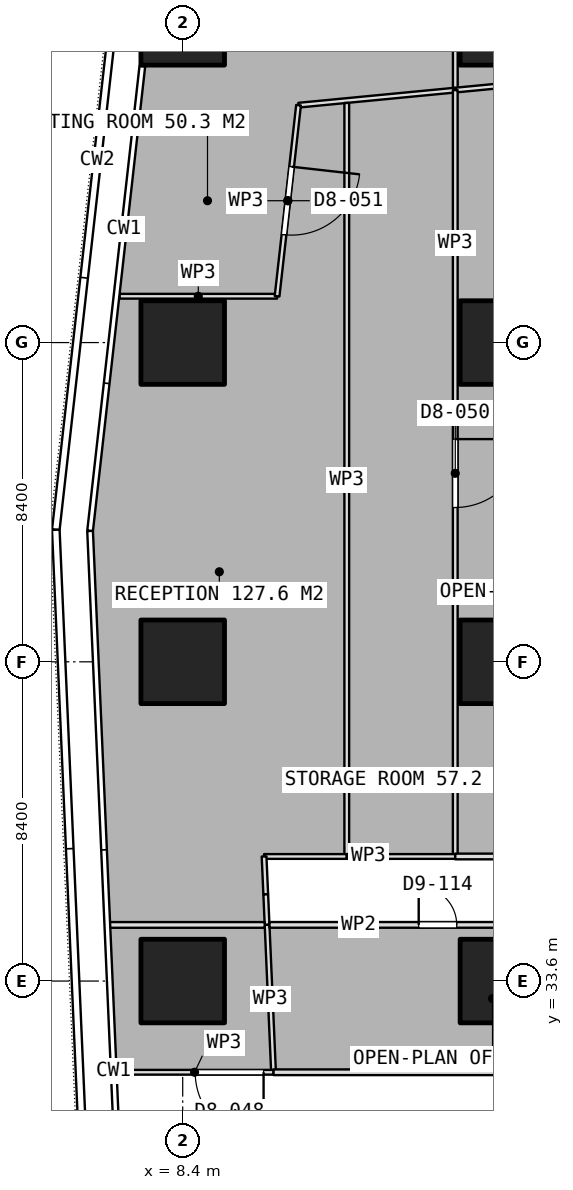
"""IFC4 building model, lengths in metres.
Left out: names, types, materials, properties, quantities, classifications, styles, units other than length and angle.
Written with IfcOpenShell. Run it as: python <this file> out.ifc"""

import sys

from ifc_helpers import new_model, si_unit, direction, frame, frame_2d, origin, origin_2d, place, context, subcontext, project, spatial, rectangle, extrude, element, fill, save


model = new_model("IFC4")
c1 = context("Model", 3, precision=1e-05, world=origin(), true_north=direction((0.0, 1.0)))
c2 = subcontext(c1, "Body", "Model", "MODEL_VIEW")
j1 = project(units=[si_unit("LENGTHUNIT", "METRE"), si_unit("PLANEANGLEUNIT", "RADIAN")], contexts=[c1])
p1 = place(None, origin())
s1 = spatial("IfcSite", under=j1, at=p1, CompositionType="ELEMENT")
p2 = place(p1, origin())
s2 = spatial("IfcBuilding", under=s1, at=p2, CompositionType="ELEMENT")
p3 = place(p2, frame((0.0, 0.0, 44.15)))
s3 = spatial("IfcBuildingStorey", under=s2, at=p3, CompositionType="ELEMENT", Elevation=44.15)
for number, where, z_axis, x_axis in (
    (1, (8.4, 33.6, 0.0), (0.0, 0.0, 1.0), (1.0, 0.0, 0.0)),
    (2, (8.4, 42.0, 0.0), (0.0, 0.0, 1.0), (1.0, 0.0, 0.0)),
    (3, (8.4, 50.4, 0.0), (0.0, 0.0, 1.0), (1.0, 0.0, 0.0)),
    (4, (8.4, 58.8, 0.0), (0.0, 0.0, 1.0), (1.0, 0.0, 0.0)),
    (5, (16.8, 33.6, 0.0), (0.0, 0.0, 1.0), (1.0, 0.0, 0.0)),
    (6, (16.8, 42.0, 0.0), (0.0, 0.0, 1.0), (1.0, 0.0, 0.0)),
    (7, (16.8, 50.4, 0.0), (0.0, 0.0, 1.0), (1.0, 0.0, 0.0)),
    (8, (16.8, 58.8, 0.0), (0.0, 0.0, 1.0), (1.0, 0.0, 0.0)),
):
    element("IfcColumn", number, at=place(p3, frame(where, z_axis=z_axis, x_axis=x_axis)), inside=s3, PredefinedType="COLUMN", context=c2, shape_type="SweptSolid", body=[
        extrude(rectangle(XDim=2.2, YDim=2.2, at=origin_2d()), origin(), (0.0, 0.0, 1.0), 3.75),
    ])
p4 = place(p3, frame((15.573, 57.043, 0.0), z_axis=(0.0, 0.0, 1.0), x_axis=(0.0, 1.0, 0.0)))
e9 = element("IfcWall", 9, at=p4, inside=s3, PredefinedType="PARTITIONING", context=c2, shape_type="SweptSolid", body=[
    extrude(rectangle(XDim=4.139, YDim=0.125, at=frame_2d((2.069, 0.0))), origin(), (0.0, 0.0, 1.0), 3.5),
])
p5 = place(p3, frame((24.08, 57.861, 0.0), z_axis=(0.0, 0.0, 1.0), x_axis=(-0.995407615834, -0.095727103477, 0.0)))
e10 = element("IfcWall", 10, at=p5, inside=s3, PredefinedType="PARTITIONING", context=c2, shape_type="SweptSolid", body=[
    extrude(rectangle(XDim=8.546, YDim=0.125, at=frame_2d((4.273, 0.0))), origin(), (0.0, 0.0, 1.0), 3.5),
])
p6 = place(p5, frame((3.808, 0.0, 0.0)))
e11 = element("IfcOpeningElement", 11, at=p6, cuts=e10, PredefinedType="OPENING", context=c2, shape_type="SweptSolid", body=[
    extrude(rectangle(XDim=1.0, YDim=2.1, at=frame_2d((0.5, 1.05))), frame((0.0, 0.073, 0.0), z_axis=(0.0, -1.0, 0.0), x_axis=(1.0, 0.0, 0.0)), (0.0, 0.0, 1.0), 0.145),
])
p7 = place(p3, frame((10.883, 51.619, 0.0), z_axis=(0.0, 0.0, 1.0), x_axis=(-1.0, 0.0, 0.0)))
e12 = element("IfcWall", 12, at=p7, inside=s3, PredefinedType="PARTITIONING", context=c2, shape_type="SweptSolid", body=[
    extrude(rectangle(XDim=4.146, YDim=0.125, at=frame_2d((2.073, 0.0))), origin(), (0.0, 0.0, 1.0), 3.5),
])
p8 = place(p3, frame((15.572, 57.043, 0.0), z_axis=(0.0, 0.0, 1.0), x_axis=(-0.995399090968, -0.095815706957, 0.0)))
e13 = element("IfcWall", 13, at=p8, inside=s3, PredefinedType="PARTITIONING", context=c2, shape_type="SweptSolid", body=[
    extrude(rectangle(XDim=4.143, YDim=0.125, at=frame_2d((2.072, 0.0))), origin(), (0.0, 0.0, 1.0), 3.5),
])
p9 = place(p3, frame((11.448, 56.646, 0.0), z_axis=(0.0, 0.0, 1.0), x_axis=(-0.111676223133, -0.993744645866, 0.0)))
e14 = element("IfcWall", 14, at=p9, inside=s3, PredefinedType="PARTITIONING", context=c2, shape_type="SweptSolid", body=[
    extrude(rectangle(XDim=5.059, YDim=0.125, at=frame_2d((2.529, 0.0))), origin(), (0.0, 0.0, 1.0), 3.5),
])
p10 = place(p9, frame((1.629, 0.0, 0.0)))
e15 = element("IfcOpeningElement", 15, at=p10, cuts=e14, PredefinedType="OPENING", context=c2, shape_type="SweptSolid", body=[
    extrude(rectangle(XDim=1.8, YDim=2.1, at=frame_2d((0.9, 1.05))), frame((0.0, 0.073, 0.0), z_axis=(0.0, -1.0, 0.0), x_axis=(1.0, 0.0, 0.0)), (0.0, 0.0, 1.0), 0.145),
])
p11 = place(p3, frame((12.717, 56.705, 0.0), z_axis=(0.0, 0.0, 1.0), x_axis=(0.0, -1.0, 0.0)))
e16 = element("IfcWall", 16, at=p11, inside=s3, PredefinedType="PARTITIONING", context=c2, shape_type="SweptSolid", body=[
    extrude(rectangle(XDim=19.827, YDim=0.125, at=frame_2d((9.914, 0.0))), origin(), (0.0, 0.0, 1.0), 3.5),
])
p12 = place(p3, frame((12.717, 36.878, 0.0), z_axis=(0.0, 0.0, 1.0), x_axis=(-1.0, 0.0, 0.0)))
e17 = element("IfcWall", 17, at=p12, inside=s3, PredefinedType="PARTITIONING", context=c2, shape_type="SweptSolid", body=[
    extrude(rectangle(XDim=2.176, YDim=0.125, at=frame_2d((1.088, 0.0))), origin(), (0.0, 0.0, 1.0), 3.5),
])
p13 = place(p3, frame((10.541, 36.878, 0.0), z_axis=(0.0, 0.0, 1.0), x_axis=(0.0440424538, -0.999029660352, 0.0)))
e18 = element("IfcWall", 18, at=p13, inside=s3, PredefinedType="PARTITIONING", context=c2, shape_type="SweptSolid", body=[
    extrude(rectangle(XDim=0.998, YDim=0.125, at=frame_2d((0.499, 0.0))), origin(), (0.0, 0.0, 1.0), 3.5),
])
p14 = place(p3, frame((10.585, 35.881, 0.0), z_axis=(0.0, 0.0, 1.0), x_axis=(0.043793560627, -0.999040601801, 0.0)))
e19 = element("IfcWall", 19, at=p14, inside=s3, PredefinedType="PARTITIONING", context=c2, shape_type="SweptSolid", body=[
    extrude(rectangle(XDim=0.803, YDim=0.125, at=frame_2d((0.401, 0.0))), origin(), (0.0, 0.0, 1.0), 3.5),
])
p15 = place(p3, frame((10.62, 35.079, 0.0), z_axis=(0.0, 0.0, 1.0), x_axis=(0.043761924835, -0.999041988074, 0.0)))
e20 = element("IfcWall", 20, at=p15, inside=s3, PredefinedType="PARTITIONING", context=c2, shape_type="SweptSolid", body=[
    extrude(rectangle(XDim=3.883, YDim=0.125, at=frame_2d((1.941, 0.0))), origin(), (0.0, 0.0, 1.0), 3.5),
])
p16 = place(p3, frame((10.79, 31.2, 0.0), z_axis=(0.0, 0.0, 1.0), x_axis=(-1.0, 0.0, 0.0)))
e21 = element("IfcWall", 21, at=p16, inside=s3, PredefinedType="PARTITIONING", context=c2, shape_type="SweptSolid", body=[
    extrude(rectangle(XDim=4.155, YDim=0.125, at=frame_2d((2.078, 0.0))), origin(), (0.0, 0.0, 1.0), 3.5),
])
p17 = place(p16, frame((0.262, 0.0, 0.0)))
e22 = element("IfcOpeningElement", 22, at=p17, cuts=e21, PredefinedType="OPENING", context=c2, shape_type="SweptSolid", body=[
    extrude(rectangle(XDim=1.8, YDim=2.1, at=frame_2d((0.9, 1.05))), frame((0.0, 0.073, 0.0), z_axis=(0.0, -1.0, 0.0), x_axis=(1.0, 0.0, 0.0)), (0.0, 0.0, 1.0), 0.145),
])
p18 = place(p3, frame((15.572, 57.043, 0.0), z_axis=(0.0, 0.0, 1.0), x_axis=(0.0, -1.0, 0.0)))
e23 = element("IfcWall", 23, at=p18, inside=s3, PredefinedType="PARTITIONING", context=c2, shape_type="SweptSolid", body=[
    extrude(rectangle(XDim=20.165, YDim=0.125, at=frame_2d((10.083, 0.0))), origin(), (0.0, 0.0, 1.0), 3.5),
])
p19 = place(p18, frame((9.183, 0.0, 0.0)))
e24 = element("IfcOpeningElement", 24, at=p19, cuts=e23, PredefinedType="OPENING", context=c2, shape_type="SweptSolid", body=[
    extrude(rectangle(XDim=1.8, YDim=2.1, at=frame_2d((0.9, 1.05))), frame((0.0, 0.073, 0.0), z_axis=(0.0, -1.0, 0.0), x_axis=(1.0, 0.0, 0.0)), (0.0, 0.0, 1.0), 0.145),
])
p20 = place(p3, frame((15.572, 36.878, 0.0), z_axis=(0.0, 0.0, 1.0), x_axis=(-1.0, 0.0, 0.0)))
e25 = element("IfcWall", 25, at=p20, inside=s3, PredefinedType="PARTITIONING", context=c2, shape_type="SweptSolid", body=[
    extrude(rectangle(XDim=2.855, YDim=0.125, at=frame_2d((1.427, 0.0))), origin(), (0.0, 0.0, 1.0), 3.5),
])
p21 = place(p3, frame((22.4, 36.878, 0.0), z_axis=(0.0, 0.0, 1.0), x_axis=(-1.0, 0.0, 0.0)))
e26 = element("IfcWall", 26, at=p21, inside=s3, PredefinedType="PARTITIONING", context=c2, shape_type="SweptSolid", body=[
    extrude(rectangle(XDim=6.828, YDim=0.15, at=frame_2d((3.414, 0.0))), origin(), (0.0, 0.0, 1.0), 3.5),
])
p22 = place(p3, frame((10.683, 35.078, 0.0), z_axis=(0.0, 0.0, 1.0), x_axis=(1.0, 0.0, 0.0)))
e27 = element("IfcWall", 27, at=p22, inside=s3, PredefinedType="PARTITIONING", context=c2, shape_type="SweptSolid", body=[
    extrude(rectangle(XDim=11.717, YDim=0.15, at=frame_2d((5.858, 0.0))), origin(), (0.0, 0.0, 1.0), 3.5),
])
p23 = place(p22, frame((3.927, 0.0, 0.0)))
e28 = element("IfcOpeningElement", 28, at=p23, cuts=e27, PredefinedType="OPENING", context=c2, shape_type="SweptSolid", body=[
    extrude(rectangle(XDim=1.0, YDim=2.1, at=frame_2d((0.5, 1.05))), frame((0.0, 0.085, 0.0), z_axis=(0.0, -1.0, 0.0), x_axis=(1.0, 0.0, 0.0)), (0.0, 0.0, 1.0), 0.17),
])
p24 = place(p3, frame((22.4, 31.2, 0.0), z_axis=(0.0, 0.0, 1.0), x_axis=(-1.0, 0.0, 0.0)))
e29 = element("IfcWall", 29, at=p24, inside=s3, PredefinedType="PARTITIONING", context=c2, shape_type="SweptSolid", body=[
    extrude(rectangle(XDim=11.61, YDim=0.15, at=frame_2d((5.805, 0.0))), origin(), (0.0, 0.0, 1.0), 3.5),
])
p25 = place(p3, frame((10.558, 35.077, 0.0), z_axis=(0.0, 0.0, 1.0), x_axis=(-1.0, 0.0, 0.0)))
e30 = element("IfcWall", 30, at=p25, inside=s3, PredefinedType="PARTITIONING", context=c2, shape_type="SweptSolid", body=[
    extrude(rectangle(XDim=4.092, YDim=0.15, at=frame_2d((2.046, 0.0))), origin(), (0.0, 0.0, 1.0), 3.5),
])
p26 = place(p17, origin())
e31 = element("IfcDoor", 31, at=p26, inside=s3, OperationType="DOUBLE_DOOR_SINGLE_SWING", PredefinedType="DOOR", context=c2, shape_type="SweptSolid", body=[
    extrude(rectangle(XDim=1.8, YDim=2.1, at=frame_2d((0.9, 1.05))), frame((0.0, 0.025, 0.0), z_axis=(0.0, -1.0, 0.0), x_axis=(1.0, 0.0, 0.0)), (0.0, 0.0, 1.0), 0.05),
])
fill(e22, e31)
p27 = place(p19, origin())
e32 = element("IfcDoor", 32, at=p27, inside=s3, OperationType="DOUBLE_DOOR_SINGLE_SWING", PredefinedType="DOOR", context=c2, shape_type="SweptSolid", body=[
    extrude(rectangle(XDim=1.8, YDim=2.1, at=frame_2d((0.9, 1.05))), frame((0.0, 0.025, 0.0), z_axis=(0.0, -1.0, 0.0), x_axis=(1.0, 0.0, 0.0)), (0.0, 0.0, 1.0), 0.05),
])
fill(e24, e32)
p28 = place(p23, origin())
e33 = element("IfcDoor", 33, at=p28, inside=s3, OperationType="SINGLE_SWING_LEFT", PredefinedType="DOOR", context=c2, shape_type="SweptSolid", body=[
    extrude(rectangle(XDim=1.0, YDim=2.1, at=frame_2d((0.5, 1.05))), frame((0.0, 0.025, 0.0), z_axis=(0.0, -1.0, 0.0), x_axis=(1.0, 0.0, 0.0)), (0.0, 0.0, 1.0), 0.05),
])
fill(e28, e33)
p29 = place(p10, origin())
e34 = element("IfcDoor", 34, at=p29, inside=s3, OperationType="DOUBLE_DOOR_SINGLE_SWING", PredefinedType="DOOR", context=c2, shape_type="SweptSolid", body=[
    extrude(rectangle(XDim=1.8, YDim=2.1, at=frame_2d((0.9, 1.05))), frame((0.0, 0.025, 0.0), z_axis=(0.0, -1.0, 0.0), x_axis=(1.0, 0.0, 0.0)), (0.0, 0.0, 1.0), 0.05),
])
fill(e15, e34)
save(model, sys.argv[1])
